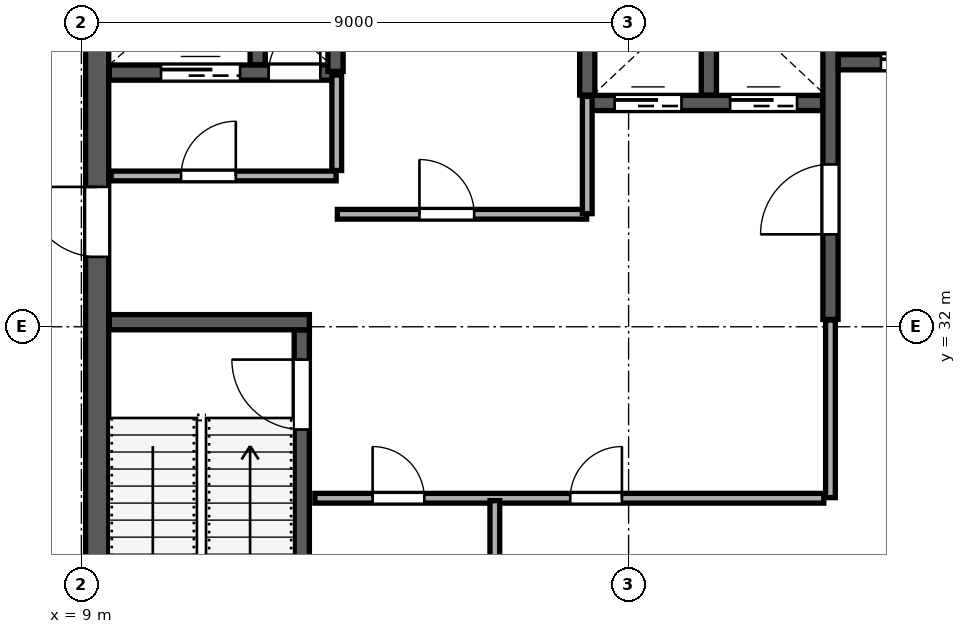
"""IFC4 building model, lengths in metres.
Left out: names, types, materials, properties, quantities, classifications, styles, units other than length and angle.
Written with IfcOpenShell. Run it as: python <this file> out.ifc"""

import sys

from ifc_helpers import new_model, si_unit, direction, frame, frame_2d, origin, place, context, subcontext, project, spatial, rectangle, extrude, source, transform, mapped, element, fill, save


model = new_model("IFC4")
c1 = context("Model", 3, precision=1e-05, world=origin(), true_north=direction((0.0, 1.0)))
c2 = subcontext(c1, "Body", "Model", "MODEL_VIEW")
j1 = project(units=[si_unit("LENGTHUNIT", "METRE"), si_unit("PLANEANGLEUNIT", "RADIAN")], contexts=[c1])
p1 = place(None, origin())
s1 = spatial("IfcSite", under=j1, at=p1, CompositionType="ELEMENT")
p2 = place(p1, origin())
s2 = spatial("IfcBuilding", under=s1, at=p2, CompositionType="ELEMENT")
p3 = place(p2, frame((0.0, 0.0, 319.8)))
s3 = spatial("IfcBuildingStorey", under=s2, at=p3, CompositionType="ELEMENT", Elevation=319.8)
p4 = place(p3, frame((9.26, 24.45, 0.0), z_axis=(0.0, 0.0, 1.0), x_axis=(0.0, 1.0, 0.0)))
e1 = element("IfcWall", 1, at=p4, inside=s3, PredefinedType="SHEAR", context=c2, shape_type="SweptSolid", body=[
    extrude(rectangle(XDim=15.1, YDim=0.38, at=frame_2d((7.55, 0.0))), origin(), (0.0, 0.0, 1.0), 3.96),
])
p5 = place(p4, frame((8.7, 0.0, 0.0)))
e2 = element("IfcOpeningElement", 2, at=p5, cuts=e1, PredefinedType="OPENING", context=c2, shape_type="SweptSolid", body=[
    extrude(rectangle(XDim=1.15, YDim=2.2, at=frame_2d((0.575, 1.1))), frame((0.0, 0.2, 0.0), z_axis=(0.0, -1.0, 0.0), x_axis=(1.0, 0.0, 0.0)), (0.0, 0.0, 1.0), 0.4),
])
p6 = place(p3, frame((12.625, 24.46, 0.0), z_axis=(0.0, 0.0, 1.0), x_axis=(0.0, 1.0, 0.0)))
e3 = element("IfcWall", 3, at=p6, inside=s3, PredefinedType="SHEAR", context=c2, shape_type="SweptSolid", body=[
    extrude(rectangle(XDim=7.49, YDim=0.25, at=frame_2d((3.745, 0.0))), origin(), (0.0, 0.0, 1.0), 3.96),
])
p7 = place(p6, frame((5.85, 0.0, 0.0)))
e4 = element("IfcOpeningElement", 4, at=p7, cuts=e3, PredefinedType="OPENING", context=c2, shape_type="SweptSolid", body=[
    extrude(rectangle(XDim=1.15, YDim=2.2, at=frame_2d((0.575, 1.1))), frame((0.0, 0.135, 0.0), z_axis=(0.0, -1.0, 0.0), x_axis=(1.0, 0.0, 0.0)), (0.0, 0.0, 1.0), 0.27),
])
p8 = place(p3, frame((9.46, 32.075, 0.0), z_axis=(0.0, 0.0, 1.0), x_axis=(1.0, 0.0, 0.0)))
e5 = element("IfcWall", 5, at=p8, inside=s3, PredefinedType="SHEAR", context=c2, shape_type="SweptSolid", body=[
    extrude(rectangle(XDim=3.29, YDim=0.25, at=frame_2d((1.645, 0.0))), origin(), (0.0, 0.0, 1.0), 3.96),
])
p9 = place(p3, frame((21.32, 32.12, 0.0), z_axis=(0.0, 0.0, 1.0), x_axis=(0.0, 1.0, 0.0)))
e6 = element("IfcWall", 6, at=p9, inside=s3, PredefinedType="SHEAR", context=c2, shape_type="SweptSolid", body=[
    extrude(rectangle(XDim=7.42, YDim=0.25, at=frame_2d((3.71, 0.0))), origin(), (0.0, 0.0, 1.0), 3.96),
])
p10 = place(p9, frame((1.4, 0.0, 0.0)))
e7 = element("IfcOpeningElement", 7, at=p10, cuts=e6, PredefinedType="OPENING", context=c2, shape_type="SweptSolid", body=[
    extrude(rectangle(XDim=1.15, YDim=2.2, at=frame_2d((0.575, 1.1))), frame((0.0, 0.135, 0.0), z_axis=(0.0, -1.0, 0.0), x_axis=(1.0, 0.0, 0.0)), (0.0, 0.0, 1.0), 0.27),
])
p11 = place(p3, frame((9.46, 36.18, 0.0), z_axis=(0.0, 0.0, 1.0), x_axis=(1.0, 0.0, 0.0)))
e8 = element("IfcWall", 8, at=p11, inside=s3, PredefinedType="SHEAR", context=c2, shape_type="SweptSolid", body=[
    extrude(rectangle(XDim=3.79, YDim=0.25, at=frame_2d((1.895, 0.0))), origin(), (0.0, 0.0, 1.0), 3.96),
])
p12 = place(p11, frame((2.62, 0.0, 0.0)))
e9 = element("IfcOpeningElement", 9, at=p12, cuts=e8, PredefinedType="OPENING", context=c2, shape_type="SweptSolid", body=[
    extrude(rectangle(XDim=0.85, YDim=2.1, at=frame_2d((0.425, 1.05))), frame((0.0, 0.135, 0.0), z_axis=(0.0, -1.0, 0.0), x_axis=(1.0, 0.0, 0.0)), (0.0, 0.0, 1.0), 0.27),
])
p13 = place(p11, frame((0.85, 0.0, 0.0)))
e10 = element("IfcOpeningElement", 10, at=p13, cuts=e8, PredefinedType="OPENING", context=c2, shape_type="SweptSolid", body=[
    extrude(rectangle(XDim=1.3, YDim=2.25, at=frame_2d((0.65, 1.125))), frame((0.0, 0.135, 0.0), z_axis=(0.0, -1.0, 0.0), x_axis=(1.0, 0.0, 0.0)), (0.0, 0.0, 1.0), 0.27),
])
p14 = place(p3, frame((11.9, 36.31, 0.0), z_axis=(0.0, 0.0, 1.0), x_axis=(0.0, 1.0, 0.0)))
e11 = element("IfcWall", 11, at=p14, inside=s3, PredefinedType="SHEAR", context=c2, shape_type="SweptSolid", body=[
    extrude(rectangle(XDim=3.23, YDim=0.25, at=frame_2d((1.615, 0.0))), origin(), (0.0, 0.0, 1.0), 3.96),
])
p15 = place(p3, frame((21.45, 36.35, 0.0), z_axis=(0.0, 0.0, 1.0), x_axis=(1.0, 0.0, 0.0)))
e12 = element("IfcWall", 12, at=p15, inside=s3, PredefinedType="SHEAR", context=c2, shape_type="SweptSolid", body=[
    extrude(rectangle(XDim=5.09, YDim=0.25, at=frame_2d((2.545, 0.0))), origin(), (0.0, 0.0, 1.0), 3.96),
])
p16 = place(p15, frame((0.7, 0.0, 0.0)))
e13 = element("IfcOpeningElement", 13, at=p16, cuts=e12, PredefinedType="OPENING", context=c2, shape_type="SweptSolid", body=[
    extrude(rectangle(XDim=1.2, YDim=2.2, at=frame_2d((0.6, 1.1))), frame((0.0, 0.135, 0.0), z_axis=(0.0, -1.0, 0.0), x_axis=(1.0, 0.0, 0.0)), (0.0, 0.0, 1.0), 0.27),
])
p17 = place(p15, frame((3.25, 0.0, 0.0)))
e14 = element("IfcOpeningElement", 14, at=p17, cuts=e12, PredefinedType="OPENING", context=c2, shape_type="SweptSolid", body=[
    extrude(rectangle(XDim=1.2, YDim=2.2, at=frame_2d((0.6, 1.1))), frame((0.0, 0.135, 0.0), z_axis=(0.0, -1.0, 0.0), x_axis=(1.0, 0.0, 0.0)), (0.0, 0.0, 1.0), 0.27),
])
p18 = place(p3, frame((13.18, 36.2, 0.0), z_axis=(0.0, 0.0, 1.0), x_axis=(0.0, 1.0, 0.0)))
e15 = element("IfcWall", 15, at=p18, inside=s3, PredefinedType="SHEAR", context=c2, shape_type="SweptSolid", body=[
    extrude(rectangle(XDim=3.34, YDim=0.25, at=frame_2d((1.67, 0.0))), origin(), (0.0, 0.0, 1.0), 3.96),
])
p19 = place(p3, frame((17.32, 35.68, 0.0), z_axis=(0.0, 0.0, 1.0), x_axis=(1.0, 0.0, 0.0)))
e16 = element("IfcWall", 16, at=p19, inside=s3, PredefinedType="SHEAR", context=c2, shape_type="SweptSolid", body=[
    extrude(rectangle(XDim=3.87, YDim=0.25, at=frame_2d((1.935, 0.0))), origin(), (0.0, 0.0, 1.0), 3.96),
])
p20 = place(p19, frame((0.45, 0.0, 0.0)))
e17 = element("IfcOpeningElement", 17, at=p20, cuts=e16, PredefinedType="OPENING", context=c2, shape_type="SweptSolid", body=[
    extrude(rectangle(XDim=1.1, YDim=2.2, at=frame_2d((0.55, 1.1))), frame((0.0, 0.135, 0.0), z_axis=(0.0, -1.0, 0.0), x_axis=(1.0, 0.0, 0.0)), (0.0, 0.0, 1.0), 0.27),
])
p21 = place(p19, frame((2.35, 0.0, 0.0)))
e18 = element("IfcOpeningElement", 18, at=p21, cuts=e16, PredefinedType="OPENING", context=c2, shape_type="SweptSolid", body=[
    extrude(rectangle(XDim=1.1, YDim=2.2, at=frame_2d((0.55, 1.1))), frame((0.0, 0.135, 0.0), z_axis=(0.0, -1.0, 0.0), x_axis=(1.0, 0.0, 0.0)), (0.0, 0.0, 1.0), 0.27),
])
for number, where, z_axis, x_axis in (
    (19, (17.32, 35.81, 0.0), (0.0, 0.0, 1.0), (0.0, 1.0, 0.0)),
    (20, (19.32, 35.81, 0.0), (0.0, 0.0, 1.0), (0.0, 1.0, 0.0)),
):
    element("IfcWall", number, at=place(p3, frame(where, z_axis=z_axis, x_axis=x_axis)), inside=s3, PredefinedType="SHEAR", context=c2, shape_type="SweptSolid", body=[
        extrude(rectangle(XDim=3.73, YDim=0.25, at=frame_2d((1.865, 0.0))), origin(), (0.0, 0.0, 1.0), 3.96),
    ])
p22 = place(p3, frame((9.49, 34.48, 0.0), z_axis=(0.0, 0.0, 1.0), x_axis=(1.0, 0.0, 0.0)))
e21 = element("IfcWall", 21, at=p22, inside=s3, PredefinedType="PARTITIONING", context=c2, shape_type="SweptSolid", body=[
    extrude(rectangle(XDim=3.7, YDim=0.16, at=frame_2d((1.85, 0.0))), origin(), (0.0, 0.0, 1.0), 3.96),
])
p23 = place(p22, frame((1.15, 0.0, 0.0)))
e22 = element("IfcOpeningElement", 22, at=p23, cuts=e21, PredefinedType="OPENING", context=c2, shape_type="SweptSolid", body=[
    extrude(rectangle(XDim=0.9, YDim=2.15, at=frame_2d((0.45, 1.075))), frame((0.0, 0.09, 0.0), z_axis=(0.0, -1.0, 0.0), x_axis=(1.0, 0.0, 0.0)), (0.0, 0.0, 1.0), 0.18),
])
p24 = place(p3, frame((13.2, 34.57, 0.0), z_axis=(0.0, 0.0, 1.0), x_axis=(0.0, 1.0, 0.0)))
e23 = element("IfcWall", 23, at=p24, inside=s3, PredefinedType="PARTITIONING", context=c2, shape_type="SweptSolid", body=[
    extrude(rectangle(XDim=1.57, YDim=0.16, at=frame_2d((0.785, 0.0))), origin(), (0.0, 0.0, 1.0), 3.96),
])
p25 = place(p3, frame((13.21, 33.85, 0.0), z_axis=(0.0, 0.0, 1.0), x_axis=(1.0, 0.0, 0.0)))
e24 = element("IfcWall", 24, at=p25, inside=s3, PredefinedType="PARTITIONING", context=c2, shape_type="SweptSolid", body=[
    extrude(rectangle(XDim=4.1, YDim=0.16, at=frame_2d((2.05, 0.0))), origin(), (0.0, 0.0, 1.0), 3.96),
])
p26 = place(p25, frame((1.35, 0.0, 0.0)))
e25 = element("IfcOpeningElement", 25, at=p26, cuts=e24, PredefinedType="OPENING", context=c2, shape_type="SweptSolid", body=[
    extrude(rectangle(XDim=0.9, YDim=2.15, at=frame_2d((0.45, 1.075))), frame((0.0, 0.09, 0.0), z_axis=(0.0, -1.0, 0.0), x_axis=(1.0, 0.0, 0.0)), (0.0, 0.0, 1.0), 0.18),
])
p27 = place(p3, frame((17.32, 33.86, 0.0), z_axis=(0.0, 0.0, 1.0), x_axis=(0.0, 1.0, 0.0)))
e26 = element("IfcWall", 26, at=p27, inside=s3, PredefinedType="PARTITIONING", context=c2, shape_type="SweptSolid", body=[
    extrude(rectangle(XDim=1.93, YDim=0.16, at=frame_2d((0.965, 0.0))), origin(), (0.0, 0.0, 1.0), 3.96),
])
p28 = place(p3, frame((12.84, 29.18, 0.0), z_axis=(0.0, 0.0, 1.0), x_axis=(1.0, 0.0, 0.0)))
e27 = element("IfcWall", 27, at=p28, inside=s3, PredefinedType="PARTITIONING", context=c2, shape_type="SweptSolid", body=[
    extrude(rectangle(XDim=8.37, YDim=0.16, at=frame_2d((4.185, 0.0))), origin(), (0.0, 0.0, 1.0), 3.96),
])
p29 = place(p28, frame((0.95, 0.0, 0.0)))
e28 = element("IfcOpeningElement", 28, at=p29, cuts=e27, PredefinedType="OPENING", context=c2, shape_type="SweptSolid", body=[
    extrude(rectangle(XDim=0.85, YDim=2.1, at=frame_2d((0.425, 1.05))), frame((0.0, 0.09, 0.0), z_axis=(0.0, -1.0, 0.0), x_axis=(1.0, 0.0, 0.0)), (0.0, 0.0, 1.0), 0.18),
])
p30 = place(p28, frame((4.2, 0.0, 0.0)))
e29 = element("IfcOpeningElement", 29, at=p30, cuts=e27, PredefinedType="OPENING", context=c2, shape_type="SweptSolid", body=[
    extrude(rectangle(XDim=0.85, YDim=2.1, at=frame_2d((0.425, 1.05))), frame((0.0, 0.09, 0.0), z_axis=(0.0, -1.0, 0.0), x_axis=(1.0, 0.0, 0.0)), (0.0, 0.0, 1.0), 0.18),
])
p31 = place(p3, frame((15.8, 24.54, 0.0), z_axis=(0.0, 0.0, 1.0), x_axis=(0.0, 1.0, 0.0)))
e30 = element("IfcWall", 30, at=p31, inside=s3, PredefinedType="PARTITIONING", context=c2, shape_type="SweptSolid", body=[
    extrude(rectangle(XDim=4.6, YDim=0.16, at=frame_2d((2.3, 0.0))), origin(), (0.0, 0.0, 1.0), 3.96),
])
p32 = place(p3, frame((21.32, 29.19, 0.0), z_axis=(0.0, 0.0, 1.0), x_axis=(0.0, 1.0, 0.0)))
e31 = element("IfcWall", 31, at=p32, inside=s3, PredefinedType="PARTITIONING", context=c2, shape_type="SweptSolid", body=[
    extrude(rectangle(XDim=2.92, YDim=0.16, at=frame_2d((1.46, 0.0))), origin(), (0.0, 0.0, 1.0), 3.96),
])
p33 = place(p3, frame((3.742, 32.498, 0.0), z_axis=(0.0, 0.0, 1.0), x_axis=(0.500005830994, -0.866022037233, 0.0)))
e32 = element("IfcWall", 32, at=p33, inside=s3, PredefinedType="PARTITIONING", context=c2, shape_type="SweptSolid", body=[
    extrude(rectangle(XDim=14.07, YDim=0.16, at=frame_2d((7.035, 0.0))), origin(), (0.0, 0.0, 1.0), 3.96),
])
p34 = place(p33, frame((1.15, 0.0, 0.0)))
e33 = element("IfcOpeningElement", 33, at=p34, cuts=e32, PredefinedType="OPENING", context=c2, shape_type="SweptSolid", body=[
    extrude(rectangle(XDim=0.95, YDim=2.15, at=frame_2d((0.475, 1.075))), frame((0.0, 0.09, 0.0), z_axis=(0.0, -1.0, 0.0), x_axis=(1.0, 0.0, 0.0)), (0.0, 0.0, 1.0), 0.18),
])
m1 = source(origin(), c2, "Body", "SweptSolid", [
    extrude(rectangle(XDim=1.15, YDim=2.2, at=frame_2d((0.575, 1.1))), frame((0.0, 0.025, 0.0), z_axis=(0.0, -1.0, 0.0), x_axis=(1.0, 0.0, 0.0)), (0.0, 0.0, 1.0), 0.05),
])
p35 = place(p7, origin())
e34 = element("IfcDoor", 34, at=p35, inside=s3, OperationType="SINGLE_SWING_RIGHT", PredefinedType="DOOR", context=c2, shape_type="MappedRepresentation", body=[
    mapped(m1, transform((0.0, 0.0, 0.0), scale=1.0)),
])
fill(e4, e34)
m2 = source(origin(), c2, "Body", "SweptSolid", [
    extrude(rectangle(XDim=1.15, YDim=2.2, at=frame_2d((0.575, 1.1))), frame((0.0, 0.025, 0.0), z_axis=(0.0, -1.0, 0.0), x_axis=(1.0, 0.0, 0.0)), (0.0, 0.0, 1.0), 0.05),
])
p36 = place(p10, origin())
e35 = element("IfcDoor", 35, at=p36, inside=s3, OperationType="SINGLE_SWING_LEFT", PredefinedType="DOOR", context=c2, shape_type="MappedRepresentation", body=[
    mapped(m2, transform((0.0, 0.0, 0.0), scale=1.0)),
])
fill(e7, e35)
p37 = place(p5, origin())
e36 = element("IfcDoor", 36, at=p37, inside=s3, OperationType="SINGLE_SWING_RIGHT", PredefinedType="DOOR", context=c2, shape_type="MappedRepresentation", body=[
    mapped(m2, transform((0.0, 0.0, 0.0), scale=1.0)),
])
fill(e2, e36)
m3 = source(origin(), c2, "Body", "SweptSolid", [
    extrude(rectangle(XDim=0.85, YDim=2.1, at=frame_2d((0.425, 1.05))), frame((0.0, 0.025, 0.0), z_axis=(0.0, -1.0, 0.0), x_axis=(1.0, 0.0, 0.0)), (0.0, 0.0, 1.0), 0.05),
])
p38 = place(p12, origin())
e37 = element("IfcDoor", 37, at=p38, inside=s3, OperationType="SINGLE_SWING_RIGHT", PredefinedType="DOOR", context=c2, shape_type="MappedRepresentation", body=[
    mapped(m3, transform((0.0, 0.0, 0.0), scale=1.0)),
])
fill(e9, e37)
m4 = source(origin(), c2, "Body", "SweptSolid", [
    extrude(rectangle(XDim=1.1, YDim=2.2, at=frame_2d((0.55, 1.1))), frame((0.0, 0.025, 0.0), z_axis=(0.0, -1.0, 0.0), x_axis=(1.0, 0.0, 0.0)), (0.0, 0.0, 1.0), 0.05),
])
p39 = place(p20, origin())
e38 = element("IfcDoor", 38, at=p39, inside=s3, OperationType="SLIDING_TO_LEFT", PredefinedType="DOOR", context=c2, shape_type="MappedRepresentation", body=[
    mapped(m4, transform((0.0, 0.0, 0.0), scale=1.0)),
])
fill(e17, e38)
p40 = place(p21, origin())
e39 = element("IfcDoor", 39, at=p40, inside=s3, OperationType="SLIDING_TO_RIGHT", PredefinedType="DOOR", context=c2, shape_type="MappedRepresentation", body=[
    mapped(m4, transform((0.0, 0.0, 0.0), scale=1.0)),
])
fill(e18, e39)
m5 = source(origin(), c2, "Body", "SweptSolid", [
    extrude(rectangle(XDim=1.2, YDim=2.2, at=frame_2d((0.6, 1.1))), frame((0.0, 0.025, 0.0), z_axis=(0.0, -1.0, 0.0), x_axis=(1.0, 0.0, 0.0)), (0.0, 0.0, 1.0), 0.05),
])
p41 = place(p16, origin())
e40 = element("IfcDoor", 40, at=p41, inside=s3, OperationType="SLIDING_TO_LEFT", PredefinedType="DOOR", context=c2, shape_type="MappedRepresentation", body=[
    mapped(m5, transform((0.0, 0.0, 0.0), scale=1.0)),
])
fill(e13, e40)
m6 = source(origin(), c2, "Body", "SweptSolid", [
    extrude(rectangle(XDim=1.3, YDim=2.25, at=frame_2d((0.65, 1.125))), frame((0.0, 0.025, 0.0), z_axis=(0.0, -1.0, 0.0), x_axis=(1.0, 0.0, 0.0)), (0.0, 0.0, 1.0), 0.05),
])
p42 = place(p13, origin())
e41 = element("IfcDoor", 41, at=p42, inside=s3, OperationType="SLIDING_TO_LEFT", PredefinedType="DOOR", context=c2, shape_type="MappedRepresentation", body=[
    mapped(m6, transform((0.0, 0.0, 0.0), scale=1.0)),
])
fill(e10, e41)
m7 = source(origin(), c2, "Body", "SweptSolid", [
    extrude(rectangle(XDim=0.9, YDim=2.15, at=frame_2d((0.45, 1.075))), frame((0.0, 0.025, 0.0), z_axis=(0.0, -1.0, 0.0), x_axis=(1.0, 0.0, 0.0)), (0.0, 0.0, 1.0), 0.05),
])
p43 = place(p23, origin())
e42 = element("IfcDoor", 42, at=p43, inside=s3, OperationType="SINGLE_SWING_RIGHT", PredefinedType="DOOR", context=c2, shape_type="MappedRepresentation", body=[
    mapped(m7, transform((0.0, 0.0, 0.0), scale=1.0)),
])
fill(e22, e42)
p44 = place(p26, origin())
e43 = element("IfcDoor", 43, at=p44, inside=s3, OperationType="SINGLE_SWING_LEFT", PredefinedType="DOOR", context=c2, shape_type="MappedRepresentation", body=[
    mapped(m7, transform((0.0, 0.0, 0.0), scale=1.0)),
])
fill(e25, e43)
p45 = place(p29, origin())
e44 = element("IfcDoor", 44, at=p45, inside=s3, OperationType="SINGLE_SWING_LEFT", PredefinedType="DOOR", context=c2, shape_type="MappedRepresentation", body=[
    mapped(m3, transform((0.0, 0.0, 0.0), scale=1.0)),
])
fill(e28, e44)
p46 = place(p30, origin())
e45 = element("IfcDoor", 45, at=p46, inside=s3, OperationType="SINGLE_SWING_RIGHT", PredefinedType="DOOR", context=c2, shape_type="MappedRepresentation", body=[
    mapped(m3, transform((0.0, 0.0, 0.0), scale=1.0)),
])
fill(e29, e45)
save(model, sys.argv[1])
